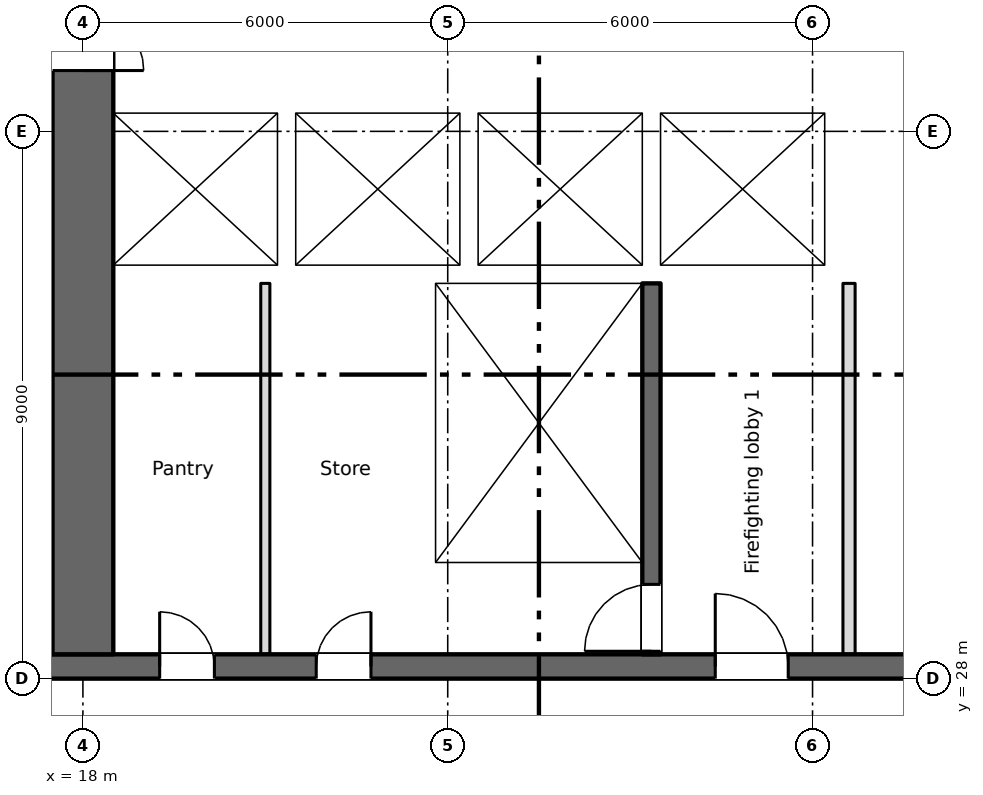
"""IFC4 building model, lengths in metres.
Left out: names, types, materials, properties, quantities, classifications, styles, units other than length and angle.
Written with IfcOpenShell. Run it as: python <this file> out.ifc"""

import sys

from ifc_helpers import new_model, si_unit, direction, frame, frame_2d, origin, place, context, subcontext, project, spatial, rectangle, extrude, element, fill, save


model = new_model("IFC4")
c1 = context("Model", 3, precision=1e-05, world=origin(), true_north=direction((0.0, 1.0)))
c2 = subcontext(c1, "Body", "Model", "MODEL_VIEW")
j1 = project(units=[si_unit("LENGTHUNIT", "METRE"), si_unit("PLANEANGLEUNIT", "RADIAN")], contexts=[c1])
p1 = place(None, origin())
s1 = spatial("IfcSite", under=j1, at=p1, CompositionType="ELEMENT")
p2 = place(p1, origin())
s2 = spatial("IfcBuilding", under=s1, at=p2, CompositionType="ELEMENT")
p3 = place(p2, frame((0.0, 0.0, 26.25)))
s3 = spatial("IfcBuildingStorey", under=s2, at=p3, CompositionType="ELEMENT", Elevation=26.25)
p4 = place(p3, frame((6.7, 28.2, 0.0), z_axis=(0.0, 0.0, 1.0), x_axis=(1.0, 0.0, 0.0)))
e1 = element("IfcWall", 1, at=p4, inside=s3, PredefinedType="SHEAR", context=c2, shape_type="SweptSolid", body=[
    extrude(rectangle(XDim=57.8, YDim=0.4, at=frame_2d((28.9, 0.0))), origin(), (0.0, 0.0, 1.0), 3.35),
])
p5 = place(p4, frame((12.562, 0.0, 0.0)))
e2 = element("IfcOpeningElement", 2, at=p5, cuts=e1, PredefinedType="OPENING", context=c2, shape_type="SweptSolid", body=[
    extrude(rectangle(XDim=0.9, YDim=2.1, at=frame_2d((0.45, 1.05))), frame((0.0, 0.21, 0.0), z_axis=(0.0, -1.0, 0.0), x_axis=(1.0, 0.0, 0.0)), (0.0, 0.0, 1.0), 0.42),
])
p6 = place(p4, frame((15.137, 0.0, 0.0)))
e3 = element("IfcOpeningElement", 3, at=p6, cuts=e1, PredefinedType="OPENING", context=c2, shape_type="SweptSolid", body=[
    extrude(rectangle(XDim=0.9, YDim=2.1, at=frame_2d((0.45, 1.05))), frame((0.0, 0.21, 0.0), z_axis=(0.0, -1.0, 0.0), x_axis=(1.0, 0.0, 0.0)), (0.0, 0.0, 1.0), 0.42),
])
p7 = place(p4, frame((49.85, 0.0, 0.0)))
e4 = element("IfcOpeningElement", 4, at=p7, cuts=e1, PredefinedType="OPENING", context=c2, shape_type="SweptSolid", body=[
    extrude(rectangle(XDim=0.9, YDim=2.1, at=frame_2d((0.45, 1.05))), frame((0.0, 0.21, 0.0), z_axis=(0.0, -1.0, 0.0), x_axis=(1.0, 0.0, 0.0)), (0.0, 0.0, 1.0), 0.42),
])
p8 = place(p4, frame((0.562, 0.0, 0.0)))
e5 = element("IfcOpeningElement", 5, at=p8, cuts=e1, PredefinedType="OPENING", context=c2, shape_type="SweptSolid", body=[
    extrude(rectangle(XDim=0.9, YDim=2.1, at=frame_2d((0.45, 1.05))), frame((0.0, 0.21, 0.0), z_axis=(0.0, -1.0, 0.0), x_axis=(1.0, 0.0, 0.0)), (0.0, 0.0, 1.0), 0.42),
])
p9 = place(p4, frame((2.137, 0.0, 0.0)))
e6 = element("IfcOpeningElement", 6, at=p9, cuts=e1, PredefinedType="OPENING", context=c2, shape_type="SweptSolid", body=[
    extrude(rectangle(XDim=0.9, YDim=2.1, at=frame_2d((0.45, 1.05))), frame((0.0, 0.21, 0.0), z_axis=(0.0, -1.0, 0.0), x_axis=(1.0, 0.0, 0.0)), (0.0, 0.0, 1.0), 0.42),
])
p10 = place(p4, frame((4.7, 0.0, 0.0)))
e7 = element("IfcOpeningElement", 7, at=p10, cuts=e1, PredefinedType="OPENING", context=c2, shape_type="SweptSolid", body=[
    extrude(rectangle(XDim=1.2, YDim=2.1, at=frame_2d((0.6, 1.05))), frame((0.0, 0.21, 0.0), z_axis=(0.0, -1.0, 0.0), x_axis=(1.0, 0.0, 0.0)), (0.0, 0.0, 1.0), 0.42),
])
p11 = place(p4, frame((31.7, 0.0, 0.0)))
e8 = element("IfcOpeningElement", 8, at=p11, cuts=e1, PredefinedType="OPENING", context=c2, shape_type="SweptSolid", body=[
    extrude(rectangle(XDim=1.2, YDim=2.1, at=frame_2d((0.6, 1.05))), frame((0.0, 0.21, 0.0), z_axis=(0.0, -1.0, 0.0), x_axis=(1.0, 0.0, 0.0)), (0.0, 0.0, 1.0), 0.42),
])
p12 = place(p4, frame((55.2, 0.0, 0.0)))
e9 = element("IfcOpeningElement", 9, at=p12, cuts=e1, PredefinedType="OPENING", context=c2, shape_type="SweptSolid", body=[
    extrude(rectangle(XDim=1.2, YDim=2.1, at=frame_2d((0.6, 1.05))), frame((0.0, 0.21, 0.0), z_axis=(0.0, -1.0, 0.0), x_axis=(1.0, 0.0, 0.0)), (0.0, 0.0, 1.0), 0.42),
])
p13 = place(p4, frame((21.7, 0.0, 0.0)))
e10 = element("IfcOpeningElement", 10, at=p13, cuts=e1, PredefinedType="OPENING", context=c2, shape_type="SweptSolid", body=[
    extrude(rectangle(XDim=1.2, YDim=2.1, at=frame_2d((0.6, 1.05))), frame((0.0, 0.21, 0.0), z_axis=(0.0, -1.0, 0.0), x_axis=(1.0, 0.0, 0.0)), (0.0, 0.0, 1.0), 0.42),
])
p14 = place(p4, frame((41.7, 0.0, 0.0)))
e11 = element("IfcOpeningElement", 11, at=p14, cuts=e1, PredefinedType="OPENING", context=c2, shape_type="SweptSolid", body=[
    extrude(rectangle(XDim=1.2, YDim=2.1, at=frame_2d((0.6, 1.05))), frame((0.0, 0.21, 0.0), z_axis=(0.0, -1.0, 0.0), x_axis=(1.0, 0.0, 0.0)), (0.0, 0.0, 1.0), 0.42),
])
p15 = place(p4, frame((24.85, 0.0, 0.0)))
e12 = element("IfcOpeningElement", 12, at=p15, cuts=e1, PredefinedType="OPENING", context=c2, shape_type="SweptSolid", body=[
    extrude(rectangle(XDim=2.4, YDim=2.1, at=frame_2d((1.2, 1.05))), frame((0.0, 0.21, 0.0), z_axis=(0.0, -1.0, 0.0), x_axis=(1.0, 0.0, 0.0)), (0.0, 0.0, 1.0), 0.42),
])
p16 = place(p4, frame((37.35, 0.0, 0.0)))
e13 = element("IfcOpeningElement", 13, at=p16, cuts=e1, PredefinedType="OPENING", context=c2, shape_type="SweptSolid", body=[
    extrude(rectangle(XDim=2.4, YDim=2.1, at=frame_2d((1.2, 1.05))), frame((0.0, 0.21, 0.0), z_axis=(0.0, -1.0, 0.0), x_axis=(1.0, 0.0, 0.0)), (0.0, 0.0, 1.0), 0.42),
])
p17 = place(p4, frame((7.85, 0.0, 0.0)))
e14 = element("IfcOpeningElement", 14, at=p17, cuts=e1, PredefinedType="OPENING", context=c2, shape_type="SweptSolid", body=[
    extrude(rectangle(XDim=2.4, YDim=2.1, at=frame_2d((1.2, 1.05))), frame((0.0, 0.21, 0.0), z_axis=(0.0, -1.0, 0.0), x_axis=(1.0, 0.0, 0.0)), (0.0, 0.0, 1.0), 0.42),
])
p18 = place(p4, frame((28.85, 0.0, 0.0)))
e15 = element("IfcOpeningElement", 15, at=p18, cuts=e1, PredefinedType="OPENING", context=c2, shape_type="SweptSolid", body=[
    extrude(rectangle(XDim=0.9, YDim=2.1, at=frame_2d((0.45, 1.05))), frame((0.0, 0.21, 0.0), z_axis=(0.0, -1.0, 0.0), x_axis=(1.0, 0.0, 0.0)), (0.0, 0.0, 1.0), 0.42),
])
p19 = place(p4, frame((34.85, 0.0, 0.0)))
e16 = element("IfcOpeningElement", 16, at=p19, cuts=e1, PredefinedType="OPENING", context=c2, shape_type="SweptSolid", body=[
    extrude(rectangle(XDim=0.9, YDim=2.1, at=frame_2d((0.45, 1.05))), frame((0.0, 0.21, 0.0), z_axis=(0.0, -1.0, 0.0), x_axis=(1.0, 0.0, 0.0)), (0.0, 0.0, 1.0), 0.42),
])
p20 = place(p3, frame((18.0, 28.4, 0.0), z_axis=(0.0, 0.0, 1.0), x_axis=(0.0, 1.0, 0.0)))
e17 = element("IfcWall", 17, at=p20, inside=s3, PredefinedType="SHEAR", context=c2, shape_type="SweptSolid", body=[
    extrude(rectangle(XDim=16.6, YDim=1.0, at=frame_2d((8.3, 0.0))), origin(), (0.0, 0.0, 1.0), 3.35),
])
p21 = place(p20, frame((9.6, 0.0, 0.0)))
e18 = element("IfcOpeningElement", 18, at=p21, cuts=e17, PredefinedType="OPENING", context=c2, shape_type="SweptSolid", body=[
    extrude(rectangle(XDim=2.0, YDim=2.1, at=frame_2d((1.0, 1.05))), frame((0.0, 0.51, 0.0), z_axis=(0.0, -1.0, 0.0), x_axis=(1.0, 0.0, 0.0)), (0.0, 0.0, 1.0), 1.02),
])
p22 = place(p20, frame((15.25, 0.0, 0.0)))
e19 = element("IfcOpeningElement", 19, at=p22, cuts=e17, PredefinedType="OPENING", context=c2, shape_type="SweptSolid", body=[
    extrude(rectangle(XDim=1.2, YDim=2.1, at=frame_2d((0.6, 1.05))), frame((0.0, 0.51, 0.0), z_axis=(0.0, -1.0, 0.0), x_axis=(1.0, 0.0, 0.0)), (0.0, 0.0, 1.0), 1.02),
])
p23 = place(p3, frame((23.65, 28.4, 0.0), z_axis=(0.0, 0.0, 1.0), x_axis=(0.0, 1.0, 0.0)))
e20 = element("IfcWall", 20, at=p23, inside=s3, PredefinedType="SHEAR", context=c2, shape_type="SweptSolid", body=[
    extrude(rectangle(XDim=6.1, YDim=0.3, at=frame_2d((3.05, 0.0))), origin(), (0.0, 0.0, 1.0), 3.35),
])
p24 = place(p3, frame((27.35, 28.4, 0.0), z_axis=(0.0, 0.0, 1.0), x_axis=(0.0, 1.0, 0.0)))
e21 = element("IfcWall", 21, at=p24, inside=s3, PredefinedType="SHEAR", context=c2, shape_type="SweptSolid", body=[
    extrude(rectangle(XDim=6.1, YDim=0.3, at=frame_2d((3.05, 0.0))), origin(), (0.0, 0.0, 1.0), 3.35),
])
p25 = place(p24, frame((0.05, 0.0, 0.0)))
e22 = element("IfcOpeningElement", 22, at=p25, cuts=e21, PredefinedType="OPENING", context=c2, shape_type="SweptSolid", body=[
    extrude(rectangle(XDim=1.1, YDim=2.1, at=frame_2d((0.55, 1.05))), frame((0.0, 0.16, 0.0), z_axis=(0.0, -1.0, 0.0), x_axis=(1.0, 0.0, 0.0)), (0.0, 0.0, 1.0), 0.32),
])
p26 = place(p3, frame((18.5, 34.65, 0.0), z_axis=(0.0, 0.0, 1.0), x_axis=(1.0, 0.0, 0.0)))
e23 = element("IfcWall", 23, at=p26, inside=s3, PredefinedType="SHEAR", context=c2, shape_type="SweptSolid", body=[
    extrude(rectangle(XDim=12.2, YDim=0.3, at=frame_2d((6.1, 0.0))), origin(), (0.0, 0.0, 1.0), 3.35),
])
p27 = place(p26, frame((9.8, 0.0, 0.0)))
e24 = element("IfcOpeningElement", 24, at=p27, cuts=e23, PredefinedType="OPENING", context=c2, shape_type="SweptSolid", body=[
    extrude(rectangle(XDim=1.1, YDim=2.1, at=frame_2d((0.55, 1.05))), frame((0.0, 0.16, 0.0), z_axis=(0.0, -1.0, 0.0), x_axis=(1.0, 0.0, 0.0)), (0.0, 0.0, 1.0), 0.32),
])
p28 = place(p3, frame((18.5, 37.45, 0.0), z_axis=(0.0, 0.0, 1.0), x_axis=(1.0, 0.0, 0.0)))
e25 = element("IfcWall", 25, at=p28, inside=s3, PredefinedType="SHEAR", context=c2, shape_type="SweptSolid", body=[
    extrude(rectangle(XDim=12.2, YDim=0.3, at=frame_2d((6.1, 0.0))), origin(), (0.0, 0.0, 1.0), 3.35),
])
p29 = place(p28, frame((0.8, 0.0, 0.0)))
e26 = element("IfcOpeningElement", 26, at=p29, cuts=e25, PredefinedType="OPENING", context=c2, shape_type="SweptSolid", body=[
    extrude(rectangle(XDim=1.1, YDim=2.1, at=frame_2d((0.55, 1.05))), frame((0.0, 0.16, 0.0), z_axis=(0.0, -1.0, 0.0), x_axis=(1.0, 0.0, 0.0)), (0.0, 0.0, 1.0), 0.32),
])
p30 = place(p28, frame((3.8, 0.0, 0.0)))
e27 = element("IfcOpeningElement", 27, at=p30, cuts=e25, PredefinedType="OPENING", context=c2, shape_type="SweptSolid", body=[
    extrude(rectangle(XDim=1.1, YDim=2.1, at=frame_2d((0.55, 1.05))), frame((0.0, 0.16, 0.0), z_axis=(0.0, -1.0, 0.0), x_axis=(1.0, 0.0, 0.0)), (0.0, 0.0, 1.0), 0.32),
])
p31 = place(p28, frame((6.8, 0.0, 0.0)))
e28 = element("IfcOpeningElement", 28, at=p31, cuts=e25, PredefinedType="OPENING", context=c2, shape_type="SweptSolid", body=[
    extrude(rectangle(XDim=1.1, YDim=2.1, at=frame_2d((0.55, 1.05))), frame((0.0, 0.16, 0.0), z_axis=(0.0, -1.0, 0.0), x_axis=(1.0, 0.0, 0.0)), (0.0, 0.0, 1.0), 0.32),
])
p32 = place(p3, frame((27.35, 34.8, 0.0), z_axis=(0.0, 0.0, 1.0), x_axis=(0.0, 1.0, 0.0)))
e29 = element("IfcWall", 29, at=p32, inside=s3, PredefinedType="SHEAR", context=c2, shape_type="SweptSolid", body=[
    extrude(rectangle(XDim=2.5, YDim=0.3, at=frame_2d((1.25, 0.0))), origin(), (0.0, 0.0, 1.0), 3.35),
])
p33 = place(p3, frame((30.45, 34.8, 0.0), z_axis=(0.0, 0.0, 1.0), x_axis=(0.0, 1.0, 0.0)))
e30 = element("IfcWall", 30, at=p33, inside=s3, PredefinedType="SHEAR", context=c2, shape_type="SweptSolid", body=[
    extrude(rectangle(XDim=2.5, YDim=0.5, at=frame_2d((1.25, 0.0))), origin(), (0.0, 0.0, 1.0), 3.35),
])
for number, where, z_axis, x_axis in (
    (31, (21.35, 34.8, 0.0), (0.0, 0.0, 1.0), (0.0, 1.0, 0.0)),
    (32, (24.35, 34.8, 0.0), (0.0, 0.0, 1.0), (0.0, 1.0, 0.0)),
):
    element("IfcWall", number, at=place(p3, frame(where, z_axis=z_axis, x_axis=x_axis)), inside=s3, PredefinedType="SHEAR", context=c2, shape_type="SweptSolid", body=[
        extrude(rectangle(XDim=2.5, YDim=0.3, at=frame_2d((1.25, 0.0))), origin(), (0.0, 0.0, 1.0), 3.35),
    ])
p34 = place(p3, frame((30.6, 28.4, 0.0), z_axis=(0.0, 0.0, 1.0), x_axis=(0.0, 1.0, 0.0)))
e33 = element("IfcWall", 33, at=p34, inside=s3, PredefinedType="PARTITIONING", context=c2, shape_type="SweptSolid", body=[
    extrude(rectangle(XDim=6.1, YDim=0.2, at=frame_2d((3.05, 0.0))), origin(), (0.0, 0.0, 1.0), 3.35),
])
p35 = place(p3, frame((21.0, 28.4, 0.0), z_axis=(0.0, 0.0, 1.0), x_axis=(0.0, 1.0, 0.0)))
e34 = element("IfcWall", 34, at=p35, inside=s3, PredefinedType="PARTITIONING", context=c2, shape_type="SweptSolid", body=[
    extrude(rectangle(XDim=6.1, YDim=0.15, at=frame_2d((3.05, 0.0))), origin(), (0.0, 0.0, 1.0), 3.35),
])
p36 = place(p5, origin())
e35 = element("IfcDoor", 35, at=p36, inside=s3, OperationType="SINGLE_SWING_LEFT", PredefinedType="DOOR", context=c2, shape_type="SweptSolid", body=[
    extrude(rectangle(XDim=0.9, YDim=2.1, at=frame_2d((0.45, 1.05))), frame((0.0, 0.025, 0.0), z_axis=(0.0, -1.0, 0.0), x_axis=(1.0, 0.0, 0.0)), (0.0, 0.0, 1.0), 0.05),
])
fill(e2, e35)
p37 = place(p6, origin())
e36 = element("IfcDoor", 36, at=p37, inside=s3, OperationType="SINGLE_SWING_RIGHT", PredefinedType="DOOR", context=c2, shape_type="SweptSolid", body=[
    extrude(rectangle(XDim=0.9, YDim=2.1, at=frame_2d((0.45, 1.05))), frame((0.0, 0.025, 0.0), z_axis=(0.0, -1.0, 0.0), x_axis=(1.0, 0.0, 0.0)), (0.0, 0.0, 1.0), 0.05),
])
fill(e3, e36)
p38 = place(p29, origin())
e37 = element("IfcDoor", 37, at=p38, inside=s3, OperationType="SLIDING_TO_LEFT", PredefinedType="DOOR", context=c2, shape_type="SweptSolid", body=[
    extrude(rectangle(XDim=1.1, YDim=2.1, at=frame_2d((0.55, 1.05))), frame((0.0, 0.025, 0.0), z_axis=(0.0, -1.0, 0.0), x_axis=(1.0, 0.0, 0.0)), (0.0, 0.0, 1.0), 0.05),
])
fill(e26, e37)
p39 = place(p30, origin())
e38 = element("IfcDoor", 38, at=p39, inside=s3, OperationType="SLIDING_TO_LEFT", PredefinedType="DOOR", context=c2, shape_type="SweptSolid", body=[
    extrude(rectangle(XDim=1.1, YDim=2.1, at=frame_2d((0.55, 1.05))), frame((0.0, 0.025, 0.0), z_axis=(0.0, -1.0, 0.0), x_axis=(1.0, 0.0, 0.0)), (0.0, 0.0, 1.0), 0.05),
])
fill(e27, e38)
p40 = place(p31, origin())
e39 = element("IfcDoor", 39, at=p40, inside=s3, OperationType="SLIDING_TO_LEFT", PredefinedType="DOOR", context=c2, shape_type="SweptSolid", body=[
    extrude(rectangle(XDim=1.1, YDim=2.1, at=frame_2d((0.55, 1.05))), frame((0.0, 0.025, 0.0), z_axis=(0.0, -1.0, 0.0), x_axis=(1.0, 0.0, 0.0)), (0.0, 0.0, 1.0), 0.05),
])
fill(e28, e39)
p41 = place(p27, origin())
e40 = element("IfcDoor", 40, at=p41, inside=s3, OperationType="SLIDING_TO_LEFT", PredefinedType="DOOR", context=c2, shape_type="SweptSolid", body=[
    extrude(rectangle(XDim=1.1, YDim=2.1, at=frame_2d((0.55, 1.05))), frame((0.0, 0.025, 0.0), z_axis=(0.0, -1.0, 0.0), x_axis=(1.0, 0.0, 0.0)), (0.0, 0.0, 1.0), 0.05),
])
fill(e24, e40)
p42 = place(p25, origin())
e41 = element("IfcDoor", 41, at=p42, inside=s3, OperationType="SINGLE_SWING_LEFT", PredefinedType="DOOR", context=c2, shape_type="SweptSolid", body=[
    extrude(rectangle(XDim=1.1, YDim=2.1, at=frame_2d((0.55, 1.05))), frame((0.0, 0.025, 0.0), z_axis=(0.0, -1.0, 0.0), x_axis=(1.0, 0.0, 0.0)), (0.0, 0.0, 1.0), 0.05),
])
fill(e22, e41)
p43 = place(p13, origin())
e42 = element("IfcDoor", 42, at=p43, inside=s3, OperationType="SINGLE_SWING_LEFT", PredefinedType="DOOR", context=c2, shape_type="SweptSolid", body=[
    extrude(rectangle(XDim=1.2, YDim=2.1, at=frame_2d((0.6, 1.05))), frame((0.0, 0.025, 0.0), z_axis=(0.0, -1.0, 0.0), x_axis=(1.0, 0.0, 0.0)), (0.0, 0.0, 1.0), 0.05),
])
fill(e10, e42)
p44 = place(p21, origin())
e43 = element("IfcDoor", 43, at=p44, inside=s3, OperationType="DOUBLE_DOOR_SINGLE_SWING", PredefinedType="DOOR", context=c2, shape_type="SweptSolid", body=[
    extrude(rectangle(XDim=2.0, YDim=2.1, at=frame_2d((1.0, 1.05))), frame((0.0, 0.025, 0.0), z_axis=(0.0, -1.0, 0.0), x_axis=(1.0, 0.0, 0.0)), (0.0, 0.0, 1.0), 0.05),
])
fill(e18, e43)
save(model, sys.argv[1])
